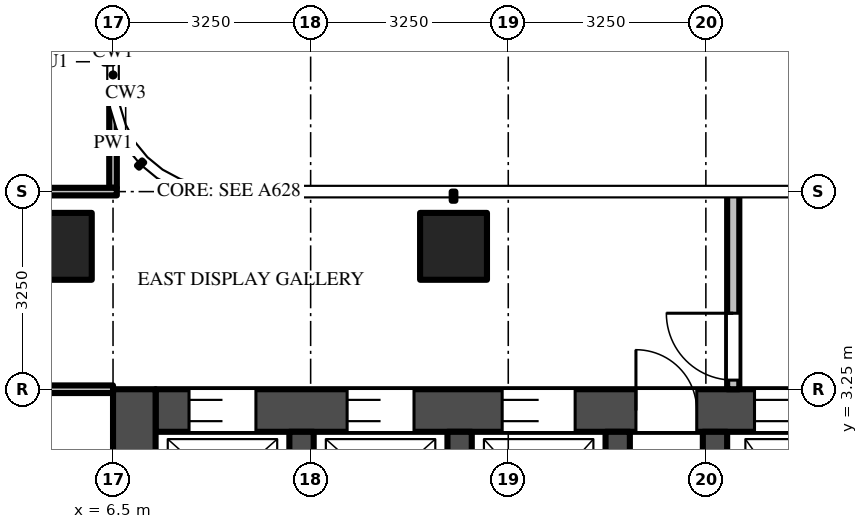
"""IFC4 building model, lengths in metres.
Left out: names, types, materials, properties, quantities, classifications, styles, units other than length and angle.
Written with IfcOpenShell. Run it as: python <this file> out.ifc"""

import sys

from ifc_helpers import new_model, si_unit, direction, frame, frame_2d, origin, origin_2d, place, context, subcontext, project, spatial, rectangle, extrude, source, transform, mapped, element, fill, save


model = new_model("IFC4")
c1 = context("Model", 3, precision=1e-05, world=origin(), true_north=direction((0.0, 1.0)))
c2 = subcontext(c1, "Body", "Model", "MODEL_VIEW")
j1 = project(units=[si_unit("LENGTHUNIT", "METRE"), si_unit("PLANEANGLEUNIT", "RADIAN")], contexts=[c1])
p1 = place(None, origin())
s1 = spatial("IfcSite", under=j1, at=p1, CompositionType="ELEMENT")
p2 = place(p1, origin())
s2 = spatial("IfcBuilding", under=s1, at=p2, CompositionType="ELEMENT")
p3 = place(p2, frame((0.0, 0.0, 224.6)))
s3 = spatial("IfcBuildingStorey", under=s2, at=p3, CompositionType="ELEMENT", Elevation=224.6)
m1 = source(origin(), c2, "Body", "SweptSolid", [
    extrude(rectangle(XDim=1.1, YDim=1.1, at=origin_2d()), origin(), (0.0, 0.0, 1.0), 3.9),
])
for number, where, z_axis, x_axis in (
    (1, (12.1, 5.6, 0.0), (0.0, 0.0, 1.0), (1.0, 0.0, 0.0)),
    (2, (5.6, 5.6, 0.0), (0.0, 0.0, 1.0), (1.0, 0.0, 0.0)),
):
    element("IfcColumn", number, at=place(p3, frame(where, z_axis=z_axis, x_axis=x_axis)), inside=s3, PredefinedType="COLUMN", context=c2, shape_type="MappedRepresentation", body=[
        mapped(m1, transform((0.0, 0.0, 0.0))),
    ])
m2 = source(origin(), c2, "Body", "SweptSolid", [
    extrude(rectangle(XDim=14.85, YDim=0.7, at=frame_2d((7.425, 0.0))), origin(), (0.0, 0.0, 1.0), 3.7),
])
p4 = place(p3, frame((7.2, 2.9, 0.0), z_axis=(0.0, 0.0, 1.0), x_axis=(1.0, 0.0, 0.0)))
e3 = element("IfcWall", 3, at=p4, inside=s3, PredefinedType="SHEAR", context=c2, shape_type="MappedRepresentation", body=[
    mapped(m2, transform((0.0, 0.0, 0.0))),
])
m3 = source(origin(), c2, "Body", "SweptSolid", [
    extrude(rectangle(XDim=1.1, YDim=2.1, at=frame_2d((0.55, 1.05))), frame((0.0, 0.36, 0.0), z_axis=(0.0, -1.0, 0.0), x_axis=(1.0, 0.0, 0.0)), (0.0, 0.0, 1.0), 0.72),
])
p5 = place(p4, frame((0.55, 0.0, 0.0)))
e4 = element("IfcOpeningElement", 4, at=p5, cuts=e3, PredefinedType="OPENING", context=c2, shape_type="MappedRepresentation", body=[
    mapped(m3, transform((0.0, 0.0, 0.0))),
])
p6 = place(p4, frame((3.15, 0.0, 0.0)))
e5 = element("IfcOpeningElement", 5, at=p6, cuts=e3, PredefinedType="OPENING", context=c2, shape_type="MappedRepresentation", body=[
    mapped(m3, transform((0.0, 0.0, 0.0))),
])
m4 = source(origin(), c2, "Body", "SweptSolid", [
    extrude(rectangle(XDim=1.2, YDim=2.1, at=frame_2d((0.6, 1.05))), frame((0.0, 0.36, 0.0), z_axis=(0.0, -1.0, 0.0), x_axis=(1.0, 0.0, 0.0)), (0.0, 0.0, 1.0), 0.72),
])
p7 = place(p4, frame((5.7, 0.0, 0.0)))
e6 = element("IfcOpeningElement", 6, at=p7, cuts=e3, PredefinedType="OPENING", context=c2, shape_type="MappedRepresentation", body=[
    mapped(m4, transform((0.0, 0.0, 0.0))),
])
m5 = source(origin(), c2, "Body", "SweptSolid", [
    extrude(rectangle(XDim=1.3, YDim=2.1, at=frame_2d((0.65, 1.05))), frame((0.0, 0.36, 0.0), z_axis=(0.0, -1.0, 0.0), x_axis=(1.0, 0.0, 0.0)), (0.0, 0.0, 1.0), 0.72),
])
p8 = place(p4, frame((12.2, 0.0, 0.0)))
e7 = element("IfcOpeningElement", 7, at=p8, cuts=e3, PredefinedType="OPENING", context=c2, shape_type="MappedRepresentation", body=[
    mapped(m5, transform((0.0, 0.0, 0.0))),
])
p9 = place(p4, frame((9.85, 0.0, 0.0)))
e8 = element("IfcOpeningElement", 8, at=p9, cuts=e3, PredefinedType="OPENING", context=c2, shape_type="MappedRepresentation", body=[
    mapped(m4, transform((0.0, 0.0, 0.0))),
])
m6 = source(origin(), c2, "Body", "SweptSolid", [
    extrude(rectangle(XDim=1.0, YDim=2.1, at=frame_2d((0.5, 1.05))), frame((0.0, 0.36, 0.0), z_axis=(0.0, -1.0, 0.0), x_axis=(1.0, 0.0, 0.0)), (0.0, 0.0, 1.0), 0.72),
])
p10 = place(p4, frame((7.9, 0.0, 0.0)))
e9 = element("IfcOpeningElement", 9, at=p10, cuts=e3, PredefinedType="OPENING", context=c2, shape_type="MappedRepresentation", body=[
    mapped(m6, transform((0.0, 0.0, 0.0))),
])
m7 = source(origin(), c2, "Body", "SweptSolid", [
    extrude(rectangle(XDim=9.05, YDim=0.7, at=frame_2d((4.525, 0.0))), origin(), (0.0, 0.0, 1.0), 3.7),
])
p11 = place(p3, frame((6.85, -5.8, 0.0), z_axis=(0.0, 0.0, 1.0), x_axis=(0.0, 1.0, 0.0)))
e10 = element("IfcWall", 10, at=p11, inside=s3, PredefinedType="SHEAR", context=c2, shape_type="MappedRepresentation", body=[
    mapped(m7, transform((0.0, 0.0, 0.0))),
])
m8 = source(origin(), c2, "Body", "SweptSolid", [
    extrude(rectangle(XDim=1.8, YDim=2.1, at=frame_2d((0.9, 1.05))), frame((0.0, 0.36, 0.0), z_axis=(0.0, -1.0, 0.0), x_axis=(1.0, 0.0, 0.0)), (0.0, 0.0, 1.0), 0.72),
])
p12 = place(p11, frame((3.15, 0.0, 0.0)))
e11 = element("IfcOpeningElement", 11, at=p12, cuts=e10, PredefinedType="OPENING", context=c2, shape_type="MappedRepresentation", body=[
    mapped(m8, transform((0.0, 0.0, 0.0))),
])
m9 = source(origin(), c2, "Body", "SweptSolid", [
    extrude(rectangle(XDim=2.45, YDim=0.4, at=frame_2d((1.225, 0.0))), origin(), (0.0, 0.0, 1.0), 3.7),
])
for number, where, z_axis, x_axis in (
    (12, (9.6, 0.1, 0.0), (0.0, 0.0, 1.0), (0.0, 1.0, 0.0)),
    (13, (12.2, 0.1, 0.0), (0.0, 0.0, 1.0), (0.0, 1.0, 0.0)),
    (14, (14.8, 0.1, 0.0), (0.0, 0.0, 1.0), (0.0, 1.0, 0.0)),
    (15, (16.4, 0.1, 0.0), (0.0, 0.0, 1.0), (0.0, 1.0, 0.0)),
):
    element("IfcWall", number, at=place(p3, frame(where, z_axis=z_axis, x_axis=x_axis)), inside=s3, PredefinedType="SHEAR", context=c2, shape_type="MappedRepresentation", body=[
        mapped(m9, transform((0.0, 0.0, 0.0))),
    ])
m10 = source(origin(), c2, "Body", "SweptSolid", [
    extrude(rectangle(XDim=3.25, YDim=0.2, at=frame_2d((1.625, 0.0))), origin(), (0.0, 0.0, 1.0), 3.7),
])
p13 = place(p3, frame((16.7, 3.25, 0.0), z_axis=(0.0, 0.0, 1.0), x_axis=(0.0, 1.0, 0.0)))
e16 = element("IfcWall", 16, at=p13, inside=s3, PredefinedType="PARTITIONING", context=c2, shape_type="MappedRepresentation", body=[
    mapped(m10, transform((0.0, 0.0, 0.0))),
])
m11 = source(origin(), c2, "Body", "SweptSolid", [
    extrude(rectangle(XDim=1.1, YDim=2.1, at=frame_2d((0.55, 1.05))), frame((0.0, 0.11, 0.0), z_axis=(0.0, -1.0, 0.0), x_axis=(1.0, 0.0, 0.0)), (0.0, 0.0, 1.0), 0.22),
])
p14 = place(p13, frame((0.15, 0.0, 0.0)))
e17 = element("IfcOpeningElement", 17, at=p14, cuts=e16, PredefinedType="OPENING", context=c2, shape_type="MappedRepresentation", body=[
    mapped(m11, transform((0.0, 0.0, 0.0))),
])
m12 = source(origin(), c2, "Body", "SweptSolid", [
    extrude(rectangle(XDim=3.0, YDim=0.2, at=frame_2d((1.5, 0.0))), origin(), (0.0, 0.0, 1.0), 3.7),
])
p15 = place(p3, frame((6.4, 8.666, 0.0), z_axis=(0.0, 0.0, 1.0), x_axis=(0.0, 1.0, 0.0)))
e18 = element("IfcWall", 18, at=p15, inside=s3, PredefinedType="SOLIDWALL", context=c2, shape_type="MappedRepresentation", body=[
    mapped(m12, transform((0.0, 0.0, 0.0))),
])
m13 = source(origin(), c2, "Body", "SweptSolid", [
    extrude(rectangle(XDim=1.8, YDim=2.4, at=frame_2d((0.9, 1.2))), frame((0.0, 0.11, 0.0), z_axis=(0.0, -1.0, 0.0), x_axis=(1.0, 0.0, 0.0)), (0.0, 0.0, 1.0), 0.22),
])
p16 = place(p15, frame((0.6, 0.0, 0.0)))
e19 = element("IfcOpeningElement", 19, at=p16, cuts=e18, PredefinedType="OPENING", context=c2, shape_type="MappedRepresentation", body=[
    mapped(m13, transform((0.0, 0.0, 0.0))),
])
m14 = source(origin(), c2, "Body", "SweptSolid", [
    extrude(rectangle(XDim=1.469, YDim=0.125, at=frame_2d((0.734, 0.0))), origin(), (0.0, 0.0, 1.0), 3.7),
])
p17 = place(p3, frame((6.5, 6.562, 0.0), z_axis=(0.0, 0.0, 1.0), x_axis=(0.0, 1.0, 0.0)))
e20 = element("IfcWall", 20, at=p17, inside=s3, PredefinedType="PARTITIONING", context=c2, shape_type="MappedRepresentation", body=[
    mapped(m14, transform((0.0, 0.0, 0.0))),
])
m15 = source(origin(), c2, "Body", "SweptSolid", [
    extrude(rectangle(XDim=5.363, YDim=0.125, at=frame_2d((2.681, 0.0))), origin(), (0.0, 0.0, 1.0), 2.997),
])
p18 = place(p3, frame((1.137, 3.25, 0.0), z_axis=(0.0, 0.0, 1.0), x_axis=(1.0, 0.0, 0.0)))
e21 = element("IfcWall", 21, at=p18, inside=s3, PredefinedType="PARTITIONING", context=c2, shape_type="MappedRepresentation", body=[
    mapped(m15, transform((0.0, 0.0, 0.0))),
])
m16 = source(origin(), c2, "Body", "SweptSolid", [
    extrude(rectangle(XDim=5.425, YDim=0.125, at=frame_2d((2.712, 0.0))), origin(), (0.0, 0.0, 1.0), 2.78),
])
p19 = place(p3, frame((1.137, 6.5, 0.0), z_axis=(0.0, 0.0, 1.0), x_axis=(1.0, 0.0, 0.0)))
e22 = element("IfcWall", 22, at=p19, inside=s3, PredefinedType="PARTITIONING", context=c2, shape_type="MappedRepresentation", body=[
    mapped(m16, transform((0.0, 0.0, 0.0))),
])
m17 = source(origin(), c2, "Body", "SweptSolid", [
    extrude(rectangle(XDim=1.1, YDim=2.1, at=frame_2d((0.55, 1.05))), frame((0.0, -0.275, 0.0), z_axis=(0.0, -1.0, 0.0), x_axis=(1.0, 0.0, 0.0)), (0.0, 0.0, 1.0), 0.05),
])
p20 = place(p5, origin())
e23 = element("IfcDoor", 23, at=p20, inside=s3, OperationType="DOUBLE_DOOR_SLIDING", PredefinedType="DOOR", context=c2, shape_type="MappedRepresentation", body=[
    mapped(m17, transform((0.0, 0.0, 0.0))),
])
fill(e4, e23)
p21 = place(p6, origin())
e24 = element("IfcDoor", 24, at=p21, inside=s3, OperationType="DOUBLE_DOOR_SLIDING", PredefinedType="DOOR", context=c2, shape_type="MappedRepresentation", body=[
    mapped(m17, transform((0.0, 0.0, 0.0))),
])
fill(e5, e24)
m18 = source(origin(), c2, "Body", "SweptSolid", [
    extrude(rectangle(XDim=1.2, YDim=2.1, at=frame_2d((0.6, 1.05))), frame((0.0, -0.275, 0.0), z_axis=(0.0, -1.0, 0.0), x_axis=(1.0, 0.0, 0.0)), (0.0, 0.0, 1.0), 0.05),
])
p22 = place(p7, origin())
e25 = element("IfcDoor", 25, at=p22, inside=s3, OperationType="DOUBLE_DOOR_SLIDING", PredefinedType="DOOR", context=c2, shape_type="MappedRepresentation", body=[
    mapped(m18, transform((0.0, 0.0, 0.0))),
])
fill(e6, e25)
p23 = place(p9, origin())
e26 = element("IfcDoor", 26, at=p23, inside=s3, OperationType="DOUBLE_DOOR_SLIDING", PredefinedType="DOOR", context=c2, shape_type="MappedRepresentation", body=[
    mapped(m18, transform((0.0, 0.0, 0.0))),
])
fill(e8, e26)
m19 = source(origin(), c2, "Body", "SweptSolid", [
    extrude(rectangle(XDim=1.0, YDim=2.1, at=frame_2d((0.5, 1.05))), frame((0.0, -0.275, 0.0), z_axis=(0.0, -1.0, 0.0), x_axis=(1.0, 0.0, 0.0)), (0.0, 0.0, 1.0), 0.05),
])
p24 = place(p10, origin())
e27 = element("IfcDoor", 27, at=p24, inside=s3, OperationType="SINGLE_SWING_LEFT", PredefinedType="DOOR", context=c2, shape_type="MappedRepresentation", body=[
    mapped(m19, transform((0.0, 0.0, 0.0))),
])
fill(e9, e27)
m20 = source(origin(), c2, "Body", "SweptSolid", [
    extrude(rectangle(XDim=1.1, YDim=2.1, at=frame_2d((0.55, 1.05))), frame((0.0, 0.025, 0.0), z_axis=(0.0, -1.0, 0.0), x_axis=(1.0, 0.0, 0.0)), (0.0, 0.0, 1.0), 0.05),
])
p25 = place(p14, origin())
e28 = element("IfcDoor", 28, at=p25, inside=s3, OperationType="SINGLE_SWING_RIGHT", PredefinedType="DOOR", context=c2, shape_type="MappedRepresentation", body=[
    mapped(m20, transform((0.0, 0.0, 0.0))),
])
fill(e17, e28)
save(model, sys.argv[1])
